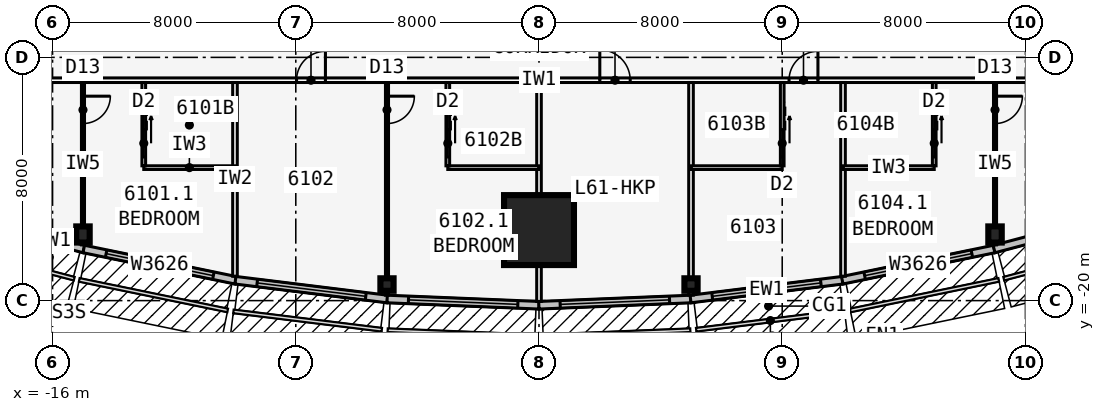
"""IFC4 building model, lengths in metres.
Left out: names, types, materials, properties, quantities, classifications, styles, units other than length and angle.
Written with IfcOpenShell. Run it as: python <this file> out.ifc"""

import sys

from ifc_helpers import new_model, si_unit, direction, frame, frame_2d, origin, origin_2d, place, context, subcontext, project, spatial, rectangle, i_section, extrude, element, fill, save


model = new_model("IFC4")
c1 = context("Model", 3, precision=1e-05, world=origin(), true_north=direction((0.0, 1.0)))
c2 = subcontext(c1, "Body", "Model", "MODEL_VIEW")
j1 = project(units=[si_unit("LENGTHUNIT", "METRE"), si_unit("PLANEANGLEUNIT", "RADIAN")], contexts=[c1])
p1 = place(None, origin())
s1 = spatial("IfcSite", under=j1, at=p1, CompositionType="ELEMENT")
p2 = place(p1, origin())
s2 = spatial("IfcBuilding", under=s1, at=p2, CompositionType="ELEMENT")
p3 = place(p2, frame((0.0, 0.0, 229.7)))
s3 = spatial("IfcBuildingStorey", under=s2, at=p3, CompositionType="ELEMENT", Elevation=229.7)
p4 = place(p3, frame((-15.0, -17.825, 0.0), z_axis=(0.0, 0.0, 1.0), x_axis=(1.0, 0.0, 0.0)))
e1 = element("IfcColumn", 1, at=p4, inside=s3, PredefinedType="COLUMN", context=c2, shape_type="SweptSolid", body=[
    extrude(i_section(OverallWidth=0.442, OverallDepth=0.531, WebThickness=0.066, FlangeThickness=0.106, at=origin_2d()), origin(), (0.0, 0.0, 1.0), 3.6),
])
for number, where, z_axis, x_axis in (
    (2, (-5.0, -19.472, 0.0), (0.0, 0.0, 1.0), (0.0, -1.0, 0.0)),
    (3, (5.0, -19.472, 0.0), (0.0, 0.0, 1.0), (0.0, -1.0, 0.0)),
):
    element("IfcColumn", number, at=place(p3, frame(where, z_axis=z_axis, x_axis=x_axis)), inside=s3, PredefinedType="COLUMN", context=c2, shape_type="SweptSolid", body=[
        extrude(i_section(OverallWidth=0.411, OverallDepth=0.434, WebThickness=0.036, FlangeThickness=0.057, at=origin_2d()), origin(), (0.0, 0.0, 1.0), 3.6),
    ])
p5 = place(p3, frame((15.0, -17.825, 0.0), z_axis=(0.0, 0.0, 1.0), x_axis=(1.0, 0.0, 0.0)))
e4 = element("IfcColumn", 4, at=p5, inside=s3, PredefinedType="COLUMN", context=c2, shape_type="SweptSolid", body=[
    extrude(i_section(OverallWidth=0.442, OverallDepth=0.531, WebThickness=0.066, FlangeThickness=0.106, at=origin_2d()), origin(), (0.0, 0.0, 1.0), 3.6),
])
p6 = place(p3, frame((0.0, -17.68, 0.0), z_axis=(0.0, 0.0, 1.0), x_axis=(0.0, -1.0, 0.0)))
e5 = element("IfcColumn", 5, at=p6, inside=s3, PredefinedType="COLUMN", context=c2, shape_type="SweptSolid", body=[
    extrude(rectangle(XDim=2.3, YDim=2.3, at=origin_2d()), origin(), (0.0, 0.0, 1.0), 3.6),
])
p7 = place(p3, frame((-16.968, -17.777, 0.0), z_axis=(0.0, 0.0, 1.0), x_axis=(0.967010286052, -0.254737328772, 0.0)))
e6 = element("IfcWall", 6, at=p7, inside=s3, PredefinedType="STANDARD", context=c2, shape_type="SweptSolid", body=[
    extrude(rectangle(XDim=2.068, YDim=0.25, at=frame_2d((1.034, 0.0))), origin(), (0.0, 0.0, 1.0), 3.35),
])
p8 = place(p3, frame((-14.975, -18.302, 0.0), z_axis=(0.0, 0.0, 1.0), x_axis=(0.979461488189, -0.201631329795, 0.0)))
e7 = element("IfcWall", 7, at=p8, inside=s3, PredefinedType="STANDARD", context=c2, shape_type="SweptSolid", body=[
    extrude(rectangle(XDim=5.105, YDim=0.25, at=frame_2d((2.552, 0.0))), origin(), (0.0, 0.0, 1.0), 3.35),
])
p9 = place(p8, frame((0.752, 0.0, 0.45)))
e8 = element("IfcOpeningElement", 8, at=p9, cuts=e7, PredefinedType="OPENING", context=c2, shape_type="SweptSolid", body=[
    extrude(rectangle(XDim=3.6, YDim=2.6, at=frame_2d((1.8, 1.3))), frame((0.0, 0.135, 0.0), z_axis=(0.0, -1.0, 0.0), x_axis=(1.0, 0.0, 0.0)), (0.0, 0.0, 1.0), 0.27),
])
p10 = place(p3, frame((-9.985, -19.33, 0.0), z_axis=(0.0, 0.0, 1.0), x_axis=(0.992449874964, -0.12265090984, 0.0)))
e9 = element("IfcWall", 9, at=p10, inside=s3, PredefinedType="STANDARD", context=c2, shape_type="SweptSolid", body=[
    extrude(rectangle(XDim=5.038, YDim=0.25, at=frame_2d((2.519, 0.0))), origin(), (0.0, 0.0, 1.0), 3.35),
])
p11 = place(p10, frame((0.719, 0.0, 0.45)))
e10 = element("IfcOpeningElement", 10, at=p11, cuts=e9, PredefinedType="OPENING", context=c2, shape_type="SweptSolid", body=[
    extrude(rectangle(XDim=3.6, YDim=2.6, at=frame_2d((1.8, 1.3))), frame((0.0, 0.135, 0.0), z_axis=(0.0, -1.0, 0.0), x_axis=(1.0, 0.0, 0.0)), (0.0, 0.0, 1.0), 0.27),
])
p12 = place(p3, frame((-4.995, -19.947, 0.0), z_axis=(0.0, 0.0, 1.0), x_axis=(0.999151909423, -0.041175986892, 0.0)))
e11 = element("IfcWall", 11, at=p12, inside=s3, PredefinedType="STANDARD", context=c2, shape_type="SweptSolid", body=[
    extrude(rectangle(XDim=5.004, YDim=0.25, at=frame_2d((2.502, 0.0))), origin(), (0.0, 0.0, 1.0), 3.35),
])
p13 = place(p12, frame((0.702, 0.0, 0.45)))
e12 = element("IfcOpeningElement", 12, at=p13, cuts=e11, PredefinedType="OPENING", context=c2, shape_type="SweptSolid", body=[
    extrude(rectangle(XDim=3.6, YDim=2.6, at=frame_2d((1.8, 1.3))), frame((0.0, 0.135, 0.0), z_axis=(0.0, -1.0, 0.0), x_axis=(1.0, 0.0, 0.0)), (0.0, 0.0, 1.0), 0.27),
])
p14 = place(p3, frame((-0.005, -20.153, 0.0), z_axis=(0.0, 0.0, 1.0), x_axis=(0.999151909423, 0.041175986892, 0.0)))
e13 = element("IfcWall", 13, at=p14, inside=s3, PredefinedType="STANDARD", context=c2, shape_type="SweptSolid", body=[
    extrude(rectangle(XDim=5.004, YDim=0.25, at=frame_2d((2.502, 0.0))), origin(), (0.0, 0.0, 1.0), 3.35),
])
p15 = place(p14, frame((0.702, 0.0, 0.45)))
e14 = element("IfcOpeningElement", 14, at=p15, cuts=e13, PredefinedType="OPENING", context=c2, shape_type="SweptSolid", body=[
    extrude(rectangle(XDim=3.6, YDim=2.6, at=frame_2d((1.8, 1.3))), frame((0.0, 0.135, 0.0), z_axis=(0.0, -1.0, 0.0), x_axis=(1.0, 0.0, 0.0)), (0.0, 0.0, 1.0), 0.27),
])
p16 = place(p3, frame((4.985, -19.948, 0.0), z_axis=(0.0, 0.0, 1.0), x_axis=(0.992449874964, 0.12265090984, 0.0)))
e15 = element("IfcWall", 15, at=p16, inside=s3, PredefinedType="STANDARD", context=c2, shape_type="SweptSolid", body=[
    extrude(rectangle(XDim=5.038, YDim=0.25, at=frame_2d((2.519, 0.0))), origin(), (0.0, 0.0, 1.0), 3.35),
])
p17 = place(p16, frame((0.719, 0.0, 0.45)))
e16 = element("IfcOpeningElement", 16, at=p17, cuts=e15, PredefinedType="OPENING", context=c2, shape_type="SweptSolid", body=[
    extrude(rectangle(XDim=3.6, YDim=2.6, at=frame_2d((1.8, 1.3))), frame((0.0, 0.135, 0.0), z_axis=(0.0, -1.0, 0.0), x_axis=(1.0, 0.0, 0.0)), (0.0, 0.0, 1.0), 0.27),
])
p18 = place(p3, frame((9.975, -19.332, 0.0), z_axis=(0.0, 0.0, 1.0), x_axis=(0.979461488189, 0.201631329795, 0.0)))
e17 = element("IfcWall", 17, at=p18, inside=s3, PredefinedType="STANDARD", context=c2, shape_type="SweptSolid", body=[
    extrude(rectangle(XDim=5.105, YDim=0.25, at=frame_2d((2.552, 0.0))), origin(), (0.0, 0.0, 1.0), 3.35),
])
p19 = place(p18, frame((0.752, 0.0, 0.45)))
e18 = element("IfcOpeningElement", 18, at=p19, cuts=e17, PredefinedType="OPENING", context=c2, shape_type="SweptSolid", body=[
    extrude(rectangle(XDim=3.6, YDim=2.6, at=frame_2d((1.8, 1.3))), frame((0.0, 0.135, 0.0), z_axis=(0.0, -1.0, 0.0), x_axis=(1.0, 0.0, 0.0)), (0.0, 0.0, 1.0), 0.27),
])
p20 = place(p3, frame((14.968, -18.304, 0.0), z_axis=(0.0, 0.0, 1.0), x_axis=(0.967010286052, 0.254737328772, 0.0)))
e19 = element("IfcWall", 19, at=p20, inside=s3, PredefinedType="STANDARD", context=c2, shape_type="SweptSolid", body=[
    extrude(rectangle(XDim=2.068, YDim=0.25, at=frame_2d((1.034, 0.0))), origin(), (0.0, 0.0, 1.0), 3.35),
])
p21 = place(p3, frame((-21.236, -12.751, 0.0), z_axis=(0.0, 0.0, 1.0), x_axis=(1.0, 0.0, 0.0)))
e20 = element("IfcWall", 20, at=p21, inside=s3, PredefinedType="PARTITIONING", context=c2, shape_type="SweptSolid", body=[
    extrude(rectangle(XDim=42.472, YDim=0.15, at=frame_2d((21.236, 0.0))), origin(), (0.0, 0.0, 1.0), 3.35),
])
p22 = place(p21, frame((2.444, 0.0, 0.0)))
e21 = element("IfcOpeningElement", 21, at=p22, cuts=e20, PredefinedType="OPENING", context=c2, shape_type="SweptSolid", body=[
    extrude(rectangle(XDim=0.95, YDim=2.13, at=frame_2d((0.475, 1.065))), frame((0.0, 0.085, 0.0), z_axis=(0.0, -1.0, 0.0), x_axis=(1.0, 0.0, 0.0)), (0.0, 0.0, 1.0), 0.17),
])
p23 = place(p21, frame((13.261, 0.0, 0.0)))
e22 = element("IfcOpeningElement", 22, at=p23, cuts=e20, PredefinedType="OPENING", context=c2, shape_type="SweptSolid", body=[
    extrude(rectangle(XDim=0.95, YDim=2.13, at=frame_2d((0.475, 1.065))), frame((0.0, 0.085, 0.0), z_axis=(0.0, -1.0, 0.0), x_axis=(1.0, 0.0, 0.0)), (0.0, 0.0, 1.0), 0.17),
])
p24 = place(p21, frame((23.236, 0.0, 0.0)))
e23 = element("IfcOpeningElement", 23, at=p24, cuts=e20, PredefinedType="OPENING", context=c2, shape_type="SweptSolid", body=[
    extrude(rectangle(XDim=1.0, YDim=2.13, at=frame_2d((0.5, 1.065))), frame((0.0, 0.085, 0.0), z_axis=(0.0, -1.0, 0.0), x_axis=(1.0, 0.0, 0.0)), (0.0, 0.0, 1.0), 0.17),
])
p25 = place(p21, frame((29.461, 0.0, 0.0)))
e24 = element("IfcOpeningElement", 24, at=p25, cuts=e20, PredefinedType="OPENING", context=c2, shape_type="SweptSolid", body=[
    extrude(rectangle(XDim=0.95, YDim=2.13, at=frame_2d((0.475, 1.065))), frame((0.0, 0.085, 0.0), z_axis=(0.0, -1.0, 0.0), x_axis=(1.0, 0.0, 0.0)), (0.0, 0.0, 1.0), 0.17),
])
p26 = place(p21, frame((39.077, 0.0, 0.0)))
e25 = element("IfcOpeningElement", 25, at=p26, cuts=e20, PredefinedType="OPENING", context=c2, shape_type="SweptSolid", body=[
    extrude(rectangle(XDim=0.95, YDim=2.13, at=frame_2d((0.475, 1.065))), frame((0.0, 0.085, 0.0), z_axis=(0.0, -1.0, 0.0), x_axis=(1.0, 0.0, 0.0)), (0.0, 0.0, 1.0), 0.17),
])
p27 = place(p3, frame((-15.0, -12.826, 0.0), z_axis=(0.0, 0.0, 1.0), x_axis=(0.0, -1.0, 0.0)))
e26 = element("IfcWall", 26, at=p27, inside=s3, PredefinedType="PARTITIONING", context=c2, shape_type="SweptSolid", body=[
    extrude(rectangle(XDim=5.34, YDim=0.1, at=frame_2d((2.67, 0.0))), origin(), (0.0, 0.0, 1.0), 2.25),
])
p28 = place(p27, frame((0.45, 0.0, 0.0)))
e27 = element("IfcOpeningElement", 27, at=p28, cuts=e26, PredefinedType="OPENING", context=c2, shape_type="SweptSolid", body=[
    extrude(rectangle(XDim=0.9, YDim=2.13, at=frame_2d((0.45, 1.065))), frame((0.0, 0.06, 0.0), z_axis=(0.0, -1.0, 0.0), x_axis=(1.0, 0.0, 0.0)), (0.0, 0.0, 1.0), 0.12),
])
p29 = place(p3, frame((-10.0, -12.826, 0.0), z_axis=(0.0, 0.0, 1.0), x_axis=(0.0, -1.0, 0.0)))
e28 = element("IfcWall", 28, at=p29, inside=s3, PredefinedType="PARTITIONING", context=c2, shape_type="SweptSolid", body=[
    extrude(rectangle(XDim=6.373, YDim=0.15, at=frame_2d((3.187, 0.0))), origin(), (0.0, 0.0, 1.0), 2.309),
])
p30 = place(p3, frame((-5.0, -12.826, 0.0), z_axis=(0.0, 0.0, 1.0), x_axis=(0.0, -1.0, 0.0)))
e29 = element("IfcWall", 29, at=p30, inside=s3, PredefinedType="PARTITIONING", context=c2, shape_type="SweptSolid", body=[
    extrude(rectangle(XDim=6.994, YDim=0.1, at=frame_2d((3.497, 0.0))), origin(), (0.0, 0.0, 1.0), 2.25),
])
p31 = place(p30, frame((0.45, 0.0, 0.0)))
e30 = element("IfcOpeningElement", 30, at=p31, cuts=e29, PredefinedType="OPENING", context=c2, shape_type="SweptSolid", body=[
    extrude(rectangle(XDim=0.9, YDim=2.13, at=frame_2d((0.45, 1.065))), frame((0.0, 0.06, 0.0), z_axis=(0.0, -1.0, 0.0), x_axis=(1.0, 0.0, 0.0)), (0.0, 0.0, 1.0), 0.12),
])
p32 = place(p3, frame((0.0, -12.826, 0.0), z_axis=(0.0, 0.0, 1.0), x_axis=(0.0, -1.0, 0.0)))
e31 = element("IfcWall", 31, at=p32, inside=s3, PredefinedType="PARTITIONING", context=c2, shape_type="SweptSolid", body=[
    extrude(rectangle(XDim=7.201, YDim=0.15, at=frame_2d((3.601, 0.0))), origin(), (0.0, 0.0, 1.0), 2.309),
])
p33 = place(p3, frame((5.0, -12.826, 0.0), z_axis=(0.0, 0.0, 1.0), x_axis=(0.0, -1.0, 0.0)))
e32 = element("IfcWall", 32, at=p33, inside=s3, PredefinedType="PARTITIONING", context=c2, shape_type="SweptSolid", body=[
    extrude(rectangle(XDim=6.994, YDim=0.15, at=frame_2d((3.497, 0.0))), origin(), (0.0, 0.0, 1.0), 2.25),
])
p34 = place(p3, frame((10.0, -12.826, 0.0), z_axis=(0.0, 0.0, 1.0), x_axis=(0.0, -1.0, 0.0)))
e33 = element("IfcWall", 33, at=p34, inside=s3, PredefinedType="PARTITIONING", context=c2, shape_type="SweptSolid", body=[
    extrude(rectangle(XDim=6.373, YDim=0.15, at=frame_2d((3.187, 0.0))), origin(), (0.0, 0.0, 1.0), 2.309),
])
p35 = place(p3, frame((15.0, -12.826, 0.0), z_axis=(0.0, 0.0, 1.0), x_axis=(0.0, -1.0, 0.0)))
e34 = element("IfcWall", 34, at=p35, inside=s3, PredefinedType="PARTITIONING", context=c2, shape_type="SweptSolid", body=[
    extrude(rectangle(XDim=5.34, YDim=0.1, at=frame_2d((2.67, 0.0))), origin(), (0.0, 0.0, 1.0), 2.25),
])
p36 = place(p35, frame((0.45, 0.0, 0.0)))
e35 = element("IfcOpeningElement", 35, at=p36, cuts=e34, PredefinedType="OPENING", context=c2, shape_type="SweptSolid", body=[
    extrude(rectangle(XDim=0.9, YDim=2.13, at=frame_2d((0.45, 1.065))), frame((0.0, 0.06, 0.0), z_axis=(0.0, -1.0, 0.0), x_axis=(1.0, 0.0, 0.0)), (0.0, 0.0, 1.0), 0.12),
])
p37 = place(p3, frame((-13.0, -15.626, 0.0), z_axis=(0.0, 0.0, 1.0), x_axis=(1.0, 0.0, 0.0)))
e36 = element("IfcWall", 36, at=p37, inside=s3, PredefinedType="PLUMBINGWALL", context=c2, shape_type="SweptSolid", body=[
    extrude(rectangle(XDim=3.0, YDim=0.12, at=frame_2d((1.5, 0.0))), origin(), (0.0, 0.0, 1.0), 3.35),
])
p38 = place(p3, frame((-13.0, -12.826, 0.0), z_axis=(0.0, 0.0, 1.0), x_axis=(0.0, -1.0, 0.0)))
e37 = element("IfcWall", 37, at=p38, inside=s3, PredefinedType="PLUMBINGWALL", context=c2, shape_type="SweptSolid", body=[
    extrude(rectangle(XDim=2.74, YDim=0.12, at=frame_2d((1.37, 0.0))), origin(), (0.0, 0.0, 1.0), 3.35),
])
p39 = place(p38, frame((1.55, 0.0, 0.0)))
e38 = element("IfcOpeningElement", 38, at=p39, cuts=e37, PredefinedType="OPENING", context=c2, shape_type="SweptSolid", body=[
    extrude(rectangle(XDim=0.9, YDim=2.13, at=frame_2d((0.45, 1.065))), frame((0.0, 0.07, 0.0), z_axis=(0.0, -1.0, 0.0), x_axis=(1.0, 0.0, 0.0)), (0.0, 0.0, 1.0), 0.14),
])
p40 = place(p3, frame((-3.0, -15.626, 0.0), z_axis=(0.0, 0.0, 1.0), x_axis=(1.0, 0.0, 0.0)))
e39 = element("IfcWall", 39, at=p40, inside=s3, PredefinedType="PLUMBINGWALL", context=c2, shape_type="SweptSolid", body=[
    extrude(rectangle(XDim=3.0, YDim=0.12, at=frame_2d((1.5, 0.0))), origin(), (0.0, 0.0, 1.0), 3.35),
])
p41 = place(p3, frame((-3.0, -12.826, 0.0), z_axis=(0.0, 0.0, 1.0), x_axis=(0.0, -1.0, 0.0)))
e40 = element("IfcWall", 40, at=p41, inside=s3, PredefinedType="PLUMBINGWALL", context=c2, shape_type="SweptSolid", body=[
    extrude(rectangle(XDim=2.74, YDim=0.12, at=frame_2d((1.37, 0.0))), origin(), (0.0, 0.0, 1.0), 3.35),
])
p42 = place(p41, frame((1.55, 0.0, 0.0)))
e41 = element("IfcOpeningElement", 41, at=p42, cuts=e40, PredefinedType="OPENING", context=c2, shape_type="SweptSolid", body=[
    extrude(rectangle(XDim=0.9, YDim=2.13, at=frame_2d((0.45, 1.065))), frame((0.0, 0.07, 0.0), z_axis=(0.0, -1.0, 0.0), x_axis=(1.0, 0.0, 0.0)), (0.0, 0.0, 1.0), 0.14),
])
p43 = place(p3, frame((5.0, -15.626, 0.0), z_axis=(0.0, 0.0, 1.0), x_axis=(1.0, 0.0, 0.0)))
e42 = element("IfcWall", 42, at=p43, inside=s3, PredefinedType="PLUMBINGWALL", context=c2, shape_type="SweptSolid", body=[
    extrude(rectangle(XDim=3.0, YDim=0.12, at=frame_2d((1.5, 0.0))), origin(), (0.0, 0.0, 1.0), 3.35),
])
p44 = place(p3, frame((8.0, -12.826, 0.0), z_axis=(0.0, 0.0, 1.0), x_axis=(0.0, -1.0, 0.0)))
e43 = element("IfcWall", 43, at=p44, inside=s3, PredefinedType="PLUMBINGWALL", context=c2, shape_type="SweptSolid", body=[
    extrude(rectangle(XDim=2.74, YDim=0.12, at=frame_2d((1.37, 0.0))), origin(), (0.0, 0.0, 1.0), 3.35),
])
p45 = place(p44, frame((1.55, 0.0, 0.0)))
e44 = element("IfcOpeningElement", 44, at=p45, cuts=e43, PredefinedType="OPENING", context=c2, shape_type="SweptSolid", body=[
    extrude(rectangle(XDim=0.9, YDim=2.13, at=frame_2d((0.45, 1.065))), frame((0.0, 0.07, 0.0), z_axis=(0.0, -1.0, 0.0), x_axis=(1.0, 0.0, 0.0)), (0.0, 0.0, 1.0), 0.14),
])
p46 = place(p3, frame((10.0, -15.626, 0.0), z_axis=(0.0, 0.0, 1.0), x_axis=(1.0, 0.0, 0.0)))
e45 = element("IfcWall", 45, at=p46, inside=s3, PredefinedType="PLUMBINGWALL", context=c2, shape_type="SweptSolid", body=[
    extrude(rectangle(XDim=3.0, YDim=0.12, at=frame_2d((1.5, 0.0))), origin(), (0.0, 0.0, 1.0), 3.35),
])
p47 = place(p3, frame((13.0, -12.826, 0.0), z_axis=(0.0, 0.0, 1.0), x_axis=(0.0, -1.0, 0.0)))
e46 = element("IfcWall", 46, at=p47, inside=s3, PredefinedType="PLUMBINGWALL", context=c2, shape_type="SweptSolid", body=[
    extrude(rectangle(XDim=2.74, YDim=0.12, at=frame_2d((1.37, 0.0))), origin(), (0.0, 0.0, 1.0), 3.35),
])
p48 = place(p47, frame((1.55, 0.0, 0.0)))
e47 = element("IfcOpeningElement", 47, at=p48, cuts=e46, PredefinedType="OPENING", context=c2, shape_type="SweptSolid", body=[
    extrude(rectangle(XDim=0.9, YDim=2.13, at=frame_2d((0.45, 1.065))), frame((0.0, 0.07, 0.0), z_axis=(0.0, -1.0, 0.0), x_axis=(1.0, 0.0, 0.0)), (0.0, 0.0, 1.0), 0.14),
])
p49 = place(p9, origin())
e48 = element("IfcWindow", 48, at=p49, inside=s3, PartitioningType="SINGLE_PANEL", PredefinedType="WINDOW", context=c2, shape_type="SweptSolid", body=[
    extrude(rectangle(XDim=3.6, YDim=2.6, at=frame_2d((1.8, 1.3))), frame((0.0, 0.03, 0.0), z_axis=(0.0, -1.0, 0.0), x_axis=(1.0, 0.0, 0.0)), (0.0, 0.0, 1.0), 0.06),
])
fill(e8, e48)
p50 = place(p11, origin())
e49 = element("IfcWindow", 49, at=p50, inside=s3, PartitioningType="SINGLE_PANEL", PredefinedType="WINDOW", context=c2, shape_type="SweptSolid", body=[
    extrude(rectangle(XDim=3.6, YDim=2.6, at=frame_2d((1.8, 1.3))), frame((0.0, 0.03, 0.0), z_axis=(0.0, -1.0, 0.0), x_axis=(1.0, 0.0, 0.0)), (0.0, 0.0, 1.0), 0.06),
])
fill(e10, e49)
p51 = place(p13, origin())
e50 = element("IfcWindow", 50, at=p51, inside=s3, PartitioningType="SINGLE_PANEL", PredefinedType="WINDOW", context=c2, shape_type="SweptSolid", body=[
    extrude(rectangle(XDim=3.6, YDim=2.6, at=frame_2d((1.8, 1.3))), frame((0.0, 0.03, 0.0), z_axis=(0.0, -1.0, 0.0), x_axis=(1.0, 0.0, 0.0)), (0.0, 0.0, 1.0), 0.06),
])
fill(e12, e50)
p52 = place(p15, origin())
e51 = element("IfcWindow", 51, at=p52, inside=s3, PartitioningType="SINGLE_PANEL", PredefinedType="WINDOW", context=c2, shape_type="SweptSolid", body=[
    extrude(rectangle(XDim=3.6, YDim=2.6, at=frame_2d((1.8, 1.3))), frame((0.0, 0.03, 0.0), z_axis=(0.0, -1.0, 0.0), x_axis=(1.0, 0.0, 0.0)), (0.0, 0.0, 1.0), 0.06),
])
fill(e14, e51)
p53 = place(p17, origin())
e52 = element("IfcWindow", 52, at=p53, inside=s3, PartitioningType="SINGLE_PANEL", PredefinedType="WINDOW", context=c2, shape_type="SweptSolid", body=[
    extrude(rectangle(XDim=3.6, YDim=2.6, at=frame_2d((1.8, 1.3))), frame((0.0, 0.03, 0.0), z_axis=(0.0, -1.0, 0.0), x_axis=(1.0, 0.0, 0.0)), (0.0, 0.0, 1.0), 0.06),
])
fill(e16, e52)
p54 = place(p19, origin())
e53 = element("IfcWindow", 53, at=p54, inside=s3, PartitioningType="SINGLE_PANEL", PredefinedType="WINDOW", context=c2, shape_type="SweptSolid", body=[
    extrude(rectangle(XDim=3.6, YDim=2.6, at=frame_2d((1.8, 1.3))), frame((0.0, 0.03, 0.0), z_axis=(0.0, -1.0, 0.0), x_axis=(1.0, 0.0, 0.0)), (0.0, 0.0, 1.0), 0.06),
])
fill(e18, e53)
p55 = place(p28, origin())
e54 = element("IfcDoor", 54, at=p55, inside=s3, OperationType="SINGLE_SWING_LEFT", PredefinedType="DOOR", context=c2, shape_type="SweptSolid", body=[
    extrude(rectangle(XDim=0.9, YDim=2.13, at=frame_2d((0.45, 1.065))), frame((0.0, 0.025, 0.0), z_axis=(0.0, -1.0, 0.0), x_axis=(1.0, 0.0, 0.0)), (0.0, 0.0, 1.0), 0.05),
])
fill(e27, e54)
p56 = place(p31, origin())
e55 = element("IfcDoor", 55, at=p56, inside=s3, OperationType="SINGLE_SWING_LEFT", PredefinedType="DOOR", context=c2, shape_type="SweptSolid", body=[
    extrude(rectangle(XDim=0.9, YDim=2.13, at=frame_2d((0.45, 1.065))), frame((0.0, 0.025, 0.0), z_axis=(0.0, -1.0, 0.0), x_axis=(1.0, 0.0, 0.0)), (0.0, 0.0, 1.0), 0.05),
])
fill(e30, e55)
p57 = place(p36, origin())
e56 = element("IfcDoor", 56, at=p57, inside=s3, OperationType="SINGLE_SWING_LEFT", PredefinedType="DOOR", context=c2, shape_type="SweptSolid", body=[
    extrude(rectangle(XDim=0.9, YDim=2.13, at=frame_2d((0.45, 1.065))), frame((0.0, 0.025, 0.0), z_axis=(0.0, -1.0, 0.0), x_axis=(1.0, 0.0, 0.0)), (0.0, 0.0, 1.0), 0.05),
])
fill(e35, e56)
p58 = place(p39, origin())
e57 = element("IfcDoor", 57, at=p58, inside=s3, OperationType="SLIDING_TO_LEFT", PredefinedType="DOOR", context=c2, shape_type="SweptSolid", body=[
    extrude(rectangle(XDim=0.9, YDim=2.13, at=frame_2d((0.45, 1.065))), frame((0.0, 0.025, 0.0), z_axis=(0.0, -1.0, 0.0), x_axis=(1.0, 0.0, 0.0)), (0.0, 0.0, 1.0), 0.05),
])
fill(e38, e57)
p59 = place(p23, origin())
e58 = element("IfcDoor", 58, at=p59, inside=s3, OperationType="SINGLE_SWING_RIGHT", PredefinedType="DOOR", context=c2, shape_type="SweptSolid", body=[
    extrude(rectangle(XDim=0.95, YDim=2.13, at=frame_2d((0.475, 1.065))), frame((0.0, 0.025, 0.0), z_axis=(0.0, -1.0, 0.0), x_axis=(1.0, 0.0, 0.0)), (0.0, 0.0, 1.0), 0.05),
])
fill(e22, e58)
p60 = place(p42, origin())
e59 = element("IfcDoor", 59, at=p60, inside=s3, OperationType="SLIDING_TO_LEFT", PredefinedType="DOOR", context=c2, shape_type="SweptSolid", body=[
    extrude(rectangle(XDim=0.9, YDim=2.13, at=frame_2d((0.45, 1.065))), frame((0.0, 0.025, 0.0), z_axis=(0.0, -1.0, 0.0), x_axis=(1.0, 0.0, 0.0)), (0.0, 0.0, 1.0), 0.05),
])
fill(e41, e59)
p61 = place(p24, origin())
e60 = element("IfcDoor", 60, at=p61, inside=s3, OperationType="SINGLE_SWING_LEFT", PredefinedType="DOOR", context=c2, shape_type="SweptSolid", body=[
    extrude(rectangle(XDim=1.0, YDim=2.13, at=frame_2d((0.5, 1.065))), frame((0.0, 0.025, 0.0), z_axis=(0.0, -1.0, 0.0), x_axis=(1.0, 0.0, 0.0)), (0.0, 0.0, 1.0), 0.05),
])
fill(e23, e60)
p62 = place(p45, origin())
e61 = element("IfcDoor", 61, at=p62, inside=s3, OperationType="SLIDING_TO_LEFT", PredefinedType="DOOR", context=c2, shape_type="SweptSolid", body=[
    extrude(rectangle(XDim=0.9, YDim=2.13, at=frame_2d((0.45, 1.065))), frame((0.0, 0.025, 0.0), z_axis=(0.0, -1.0, 0.0), x_axis=(1.0, 0.0, 0.0)), (0.0, 0.0, 1.0), 0.05),
])
fill(e44, e61)
p63 = place(p25, origin())
e62 = element("IfcDoor", 62, at=p63, inside=s3, OperationType="SINGLE_SWING_RIGHT", PredefinedType="DOOR", context=c2, shape_type="SweptSolid", body=[
    extrude(rectangle(XDim=0.95, YDim=2.13, at=frame_2d((0.475, 1.065))), frame((0.0, 0.025, 0.0), z_axis=(0.0, -1.0, 0.0), x_axis=(1.0, 0.0, 0.0)), (0.0, 0.0, 1.0), 0.05),
])
fill(e24, e62)
p64 = place(p48, origin())
e63 = element("IfcDoor", 63, at=p64, inside=s3, OperationType="SLIDING_TO_LEFT", PredefinedType="DOOR", context=c2, shape_type="SweptSolid", body=[
    extrude(rectangle(XDim=0.9, YDim=2.13, at=frame_2d((0.45, 1.065))), frame((0.0, 0.025, 0.0), z_axis=(0.0, -1.0, 0.0), x_axis=(1.0, 0.0, 0.0)), (0.0, 0.0, 1.0), 0.05),
])
fill(e47, e63)
save(model, sys.argv[1])
